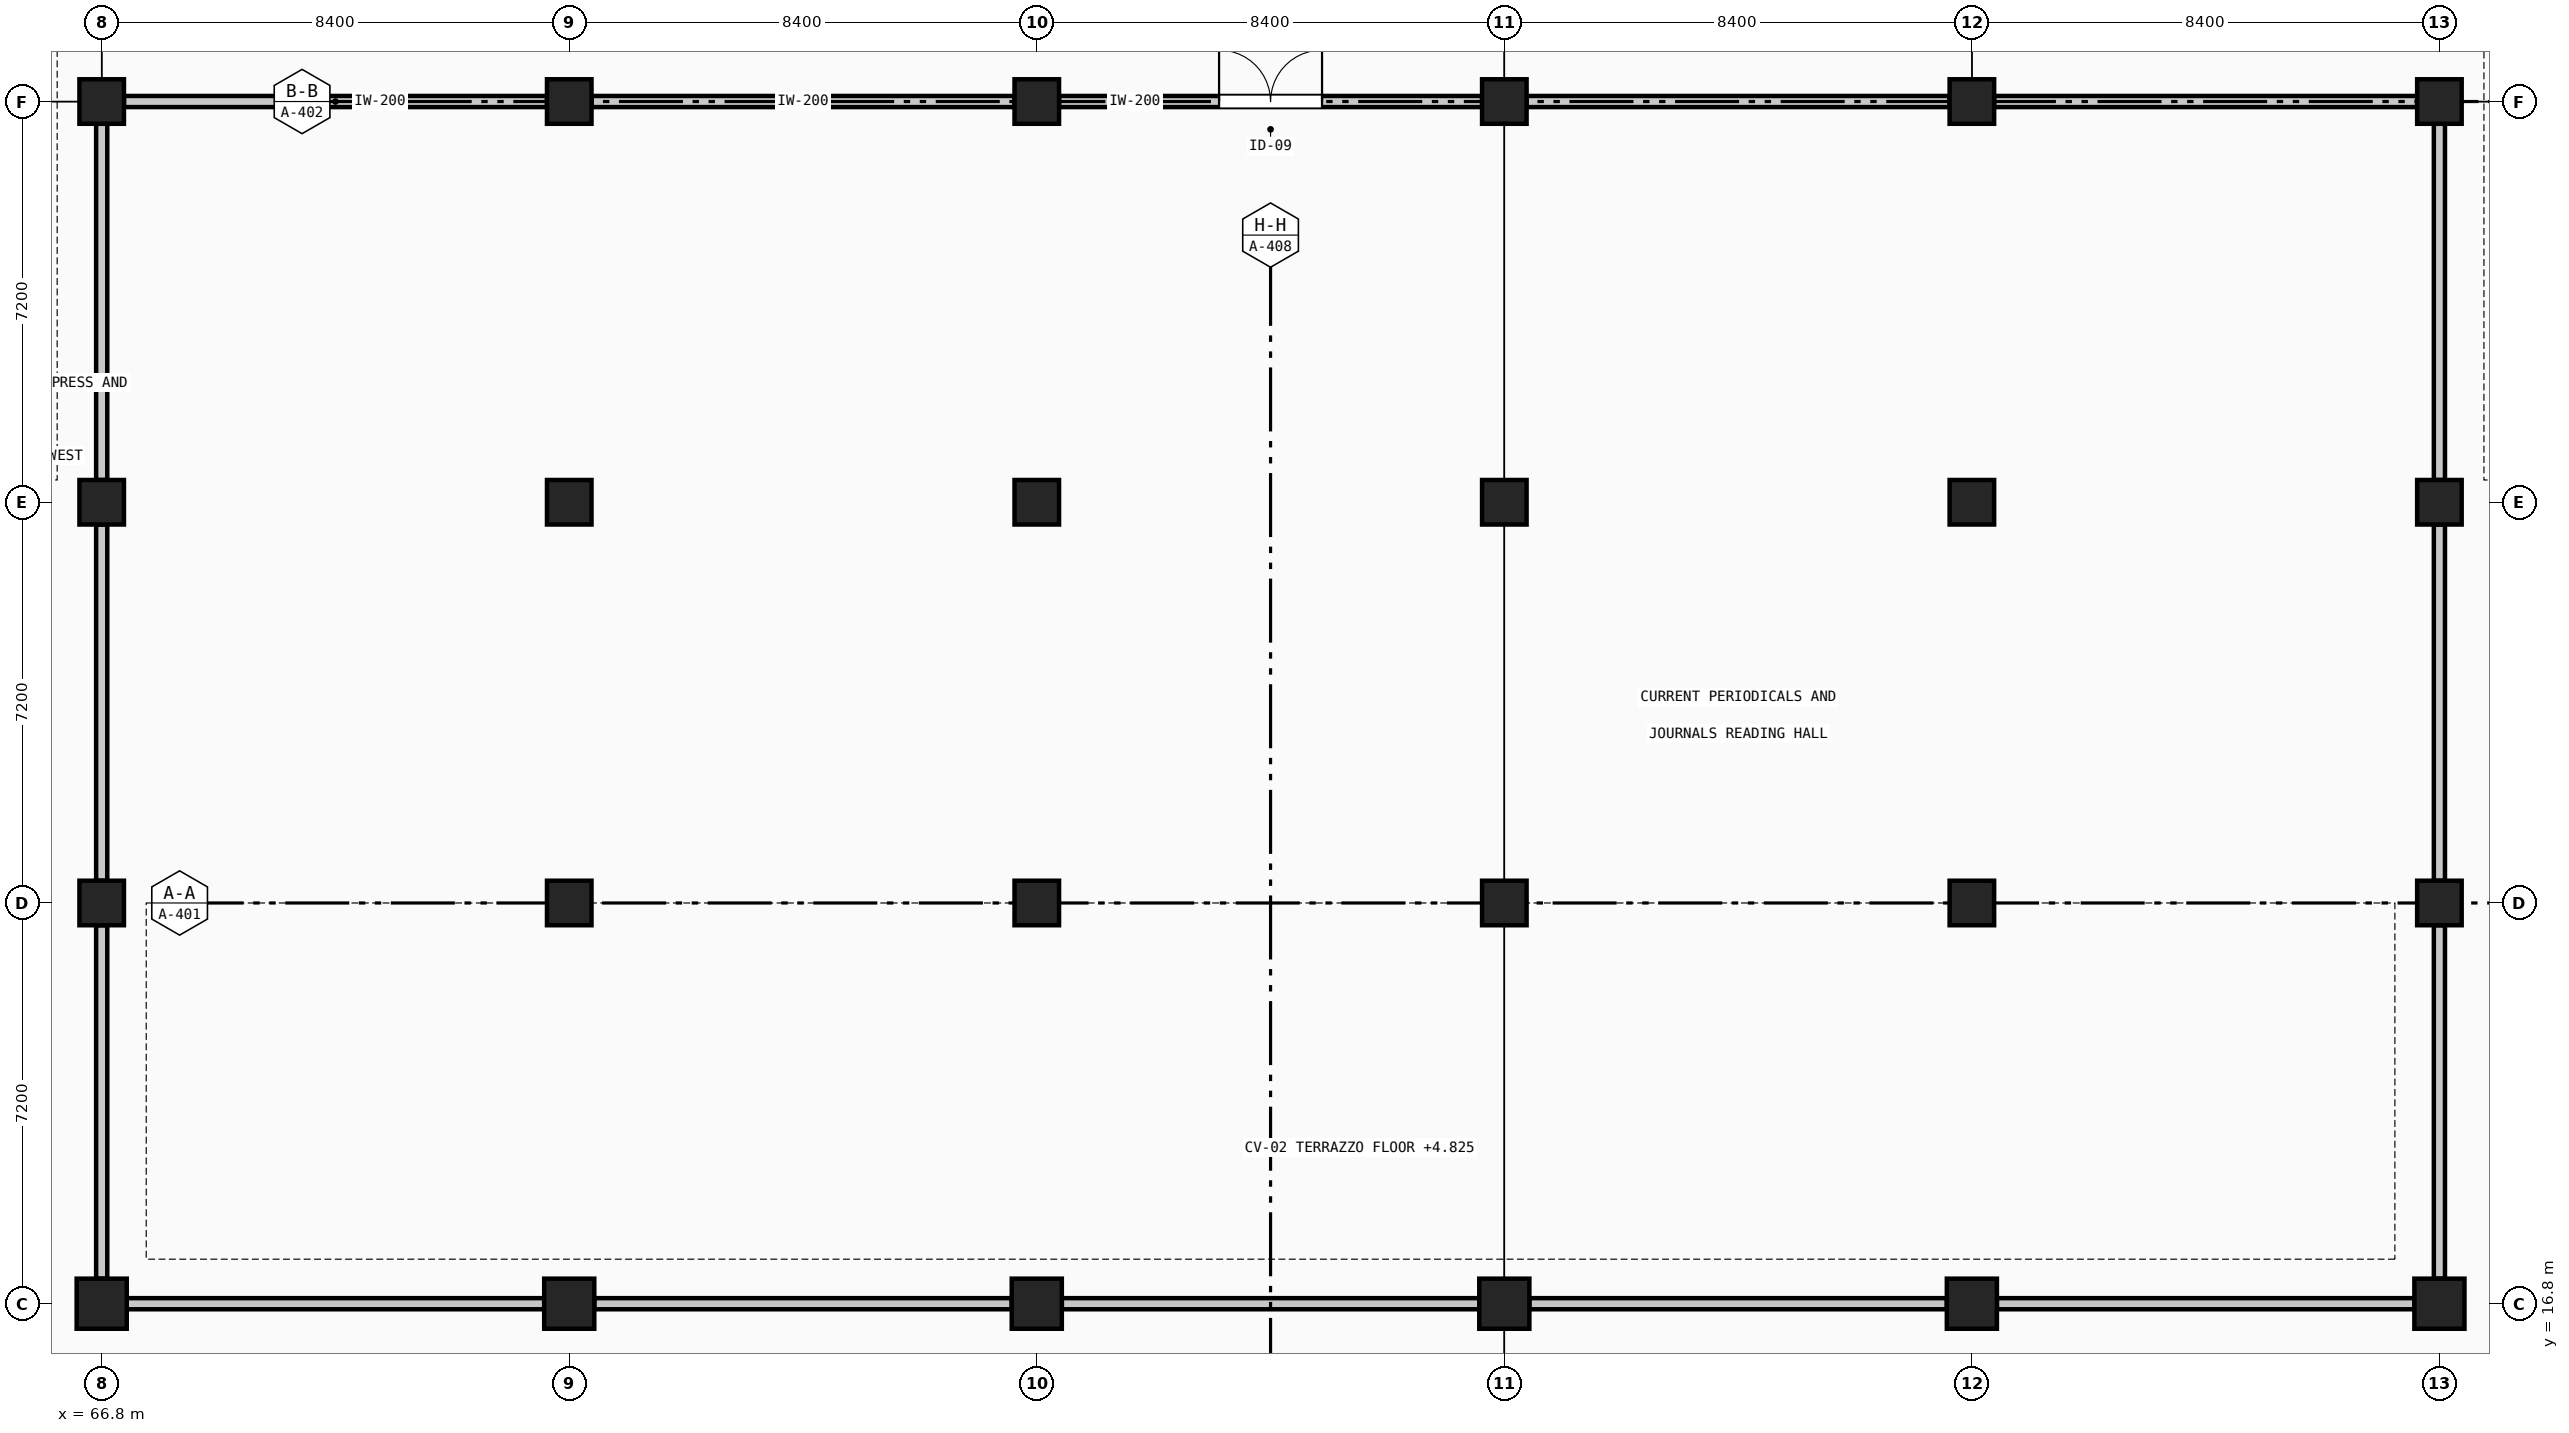
"""IFC4 building model, lengths in metres.
Left out: names, types, materials, properties, quantities, classifications, styles, units other than length and angle.
Written with IfcOpenShell. Run it as: python <this file> out.ifc"""

import sys

from ifc_helpers import new_model, si_unit, direction, frame, frame_2d, origin, origin_2d, place, context, subcontext, project, spatial, rectangle, extrude, element, fill, save


model = new_model("IFC4")
c1 = context("Model", 3, precision=1e-05, world=origin(), true_north=direction((0.0, 1.0)))
c2 = subcontext(c1, "Body", "Model", "MODEL_VIEW")
j1 = project(units=[si_unit("LENGTHUNIT", "METRE"), si_unit("PLANEANGLEUNIT", "RADIAN")], contexts=[c1])
p1 = place(None, origin())
s1 = spatial("IfcSite", under=j1, at=p1, CompositionType="ELEMENT")
p2 = place(p1, origin())
s2 = spatial("IfcBuilding", under=s1, at=p2, CompositionType="ELEMENT")
p3 = place(p2, frame((0.0, 0.0, 4.8)))
s3 = spatial("IfcBuildingStorey", under=s2, at=p3, CompositionType="ELEMENT", Elevation=4.8)
p4 = place(p3, frame((66.8, 16.8, 0.0), z_axis=(0.0, 0.0, 1.0), x_axis=(1.0, 0.0, 0.0)))
e1 = element("IfcColumn", 1, at=p4, inside=s3, PredefinedType="COLUMN", context=c2, shape_type="SweptSolid", body=[
    extrude(rectangle(XDim=0.9, YDim=0.9, at=origin_2d()), origin(), (0.0, 0.0, 1.0), 4.8),
])
for number, where, z_axis, x_axis in (
    (2, (66.8, 24.0, 0.0), (0.0, 0.0, 1.0), (1.0, 0.0, 0.0)),
    (3, (66.8, 31.2, 0.0), (0.0, 0.0, 1.0), (1.0, 0.0, 0.0)),
    (4, (66.8, 38.4, 0.0), (0.0, 0.0, 1.0), (1.0, 0.0, 0.0)),
):
    element("IfcColumn", number, at=place(p3, frame(where, z_axis=z_axis, x_axis=x_axis)), inside=s3, PredefinedType="COLUMN", context=c2, shape_type="SweptSolid", body=[
        extrude(rectangle(XDim=0.8, YDim=0.8, at=origin_2d()), origin(), (0.0, 0.0, 1.0), 4.8),
    ])
p5 = place(p3, frame((75.2, 16.8, 0.0), z_axis=(0.0, 0.0, 1.0), x_axis=(1.0, 0.0, 0.0)))
e5 = element("IfcColumn", 5, at=p5, inside=s3, PredefinedType="COLUMN", context=c2, shape_type="SweptSolid", body=[
    extrude(rectangle(XDim=0.9, YDim=0.9, at=origin_2d()), origin(), (0.0, 0.0, 1.0), 4.8),
])
for number, where, z_axis, x_axis in (
    (6, (75.2, 24.0, 0.0), (0.0, 0.0, 1.0), (1.0, 0.0, 0.0)),
    (7, (75.2, 31.2, 0.0), (0.0, 0.0, 1.0), (1.0, 0.0, 0.0)),
    (8, (75.2, 38.4, 0.0), (0.0, 0.0, 1.0), (1.0, 0.0, 0.0)),
):
    element("IfcColumn", number, at=place(p3, frame(where, z_axis=z_axis, x_axis=x_axis)), inside=s3, PredefinedType="COLUMN", context=c2, shape_type="SweptSolid", body=[
        extrude(rectangle(XDim=0.8, YDim=0.8, at=origin_2d()), origin(), (0.0, 0.0, 1.0), 4.8),
    ])
p6 = place(p3, frame((83.6, 16.8, 0.0), z_axis=(0.0, 0.0, 1.0), x_axis=(1.0, 0.0, 0.0)))
e9 = element("IfcColumn", 9, at=p6, inside=s3, PredefinedType="COLUMN", context=c2, shape_type="SweptSolid", body=[
    extrude(rectangle(XDim=0.9, YDim=0.9, at=origin_2d()), origin(), (0.0, 0.0, 1.0), 4.8),
])
for number, where, z_axis, x_axis in (
    (10, (83.6, 24.0, 0.0), (0.0, 0.0, 1.0), (1.0, 0.0, 0.0)),
    (11, (83.6, 31.2, 0.0), (0.0, 0.0, 1.0), (1.0, 0.0, 0.0)),
    (12, (83.6, 38.4, 0.0), (0.0, 0.0, 1.0), (1.0, 0.0, 0.0)),
):
    element("IfcColumn", number, at=place(p3, frame(where, z_axis=z_axis, x_axis=x_axis)), inside=s3, PredefinedType="COLUMN", context=c2, shape_type="SweptSolid", body=[
        extrude(rectangle(XDim=0.8, YDim=0.8, at=origin_2d()), origin(), (0.0, 0.0, 1.0), 4.8),
    ])
p7 = place(p3, frame((92.0, 16.8, 0.0), z_axis=(0.0, 0.0, 1.0), x_axis=(1.0, 0.0, 0.0)))
e13 = element("IfcColumn", 13, at=p7, inside=s3, PredefinedType="COLUMN", context=c2, shape_type="SweptSolid", body=[
    extrude(rectangle(XDim=0.9, YDim=0.9, at=origin_2d()), origin(), (0.0, 0.0, 1.0), 4.8),
])
for number, where, z_axis, x_axis in (
    (14, (92.0, 24.0, 0.0), (0.0, 0.0, 1.0), (1.0, 0.0, 0.0)),
    (15, (92.0, 31.2, 0.0), (0.0, 0.0, 1.0), (1.0, 0.0, 0.0)),
    (16, (92.0, 38.4, 0.0), (0.0, 0.0, 1.0), (1.0, 0.0, 0.0)),
):
    element("IfcColumn", number, at=place(p3, frame(where, z_axis=z_axis, x_axis=x_axis)), inside=s3, PredefinedType="COLUMN", context=c2, shape_type="SweptSolid", body=[
        extrude(rectangle(XDim=0.8, YDim=0.8, at=origin_2d()), origin(), (0.0, 0.0, 1.0), 4.8),
    ])
p8 = place(p3, frame((100.4, 16.8, 0.0), z_axis=(0.0, 0.0, 1.0), x_axis=(1.0, 0.0, 0.0)))
e17 = element("IfcColumn", 17, at=p8, inside=s3, PredefinedType="COLUMN", context=c2, shape_type="SweptSolid", body=[
    extrude(rectangle(XDim=0.9, YDim=0.9, at=origin_2d()), origin(), (0.0, 0.0, 1.0), 4.8),
])
for number, where, z_axis, x_axis in (
    (18, (100.4, 24.0, 0.0), (0.0, 0.0, 1.0), (1.0, 0.0, 0.0)),
    (19, (100.4, 31.2, 0.0), (0.0, 0.0, 1.0), (1.0, 0.0, 0.0)),
    (20, (100.4, 38.4, 0.0), (0.0, 0.0, 1.0), (1.0, 0.0, 0.0)),
):
    element("IfcColumn", number, at=place(p3, frame(where, z_axis=z_axis, x_axis=x_axis)), inside=s3, PredefinedType="COLUMN", context=c2, shape_type="SweptSolid", body=[
        extrude(rectangle(XDim=0.8, YDim=0.8, at=origin_2d()), origin(), (0.0, 0.0, 1.0), 4.8),
    ])
p9 = place(p3, frame((108.8, 16.8, 0.0), z_axis=(0.0, 0.0, 1.0), x_axis=(1.0, 0.0, 0.0)))
e21 = element("IfcColumn", 21, at=p9, inside=s3, PredefinedType="COLUMN", context=c2, shape_type="SweptSolid", body=[
    extrude(rectangle(XDim=0.9, YDim=0.9, at=origin_2d()), origin(), (0.0, 0.0, 1.0), 4.8),
])
for number, where, z_axis, x_axis in (
    (22, (108.8, 24.0, 0.0), (0.0, 0.0, 1.0), (1.0, 0.0, 0.0)),
    (23, (108.8, 31.2, 0.0), (0.0, 0.0, 1.0), (1.0, 0.0, 0.0)),
    (24, (108.8, 38.4, 0.0), (0.0, 0.0, 1.0), (1.0, 0.0, 0.0)),
):
    element("IfcColumn", number, at=place(p3, frame(where, z_axis=z_axis, x_axis=x_axis)), inside=s3, PredefinedType="COLUMN", context=c2, shape_type="SweptSolid", body=[
        extrude(rectangle(XDim=0.8, YDim=0.8, at=origin_2d()), origin(), (0.0, 0.0, 1.0), 4.8),
    ])
p10 = place(p3, frame((67.2, 38.4, 0.0), z_axis=(0.0, 0.0, 1.0), x_axis=(1.0, 0.0, 0.0)))
e25 = element("IfcWall", 25, at=p10, inside=s3, PredefinedType="PARTITIONING", context=c2, shape_type="SweptSolid", body=[
    extrude(rectangle(XDim=7.6, YDim=0.2, at=frame_2d((3.8, 0.0))), origin(), (0.0, 0.0, 1.0), 4.0),
])
p11 = place(p3, frame((75.6, 38.4, 0.0), z_axis=(0.0, 0.0, 1.0), x_axis=(1.0, 0.0, 0.0)))
e26 = element("IfcWall", 26, at=p11, inside=s3, PredefinedType="PARTITIONING", context=c2, shape_type="SweptSolid", body=[
    extrude(rectangle(XDim=7.6, YDim=0.2, at=frame_2d((3.8, 0.0))), origin(), (0.0, 0.0, 1.0), 4.0),
])
p12 = place(p3, frame((84.0, 38.4, 0.0), z_axis=(0.0, 0.0, 1.0), x_axis=(1.0, 0.0, 0.0)))
e27 = element("IfcWall", 27, at=p12, inside=s3, PredefinedType="PARTITIONING", context=c2, shape_type="SweptSolid", body=[
    extrude(rectangle(XDim=7.6, YDim=0.2, at=frame_2d((3.8, 0.0))), origin(), (0.0, 0.0, 1.0), 4.0),
])
p13 = place(p12, frame((2.875, 0.0, 0.0)))
e28 = element("IfcOpeningElement", 28, at=p13, cuts=e27, PredefinedType="OPENING", context=c2, shape_type="SweptSolid", body=[
    extrude(rectangle(XDim=1.85, YDim=2.3, at=frame_2d((0.925, 1.15))), frame((0.0, 0.11, 0.0), z_axis=(0.0, -1.0, 0.0), x_axis=(1.0, 0.0, 0.0)), (0.0, 0.0, 1.0), 0.22),
])
p14 = place(p3, frame((92.4, 38.4, 0.0), z_axis=(0.0, 0.0, 1.0), x_axis=(1.0, 0.0, 0.0)))
e29 = element("IfcWall", 29, at=p14, inside=s3, PredefinedType="PARTITIONING", context=c2, shape_type="SweptSolid", body=[
    extrude(rectangle(XDim=7.6, YDim=0.2, at=frame_2d((3.8, 0.0))), origin(), (0.0, 0.0, 1.0), 4.0),
])
p15 = place(p3, frame((100.8, 38.4, 0.0), z_axis=(0.0, 0.0, 1.0), x_axis=(1.0, 0.0, 0.0)))
e30 = element("IfcWall", 30, at=p15, inside=s3, PredefinedType="PARTITIONING", context=c2, shape_type="SweptSolid", body=[
    extrude(rectangle(XDim=7.6, YDim=0.2, at=frame_2d((3.8, 0.0))), origin(), (0.0, 0.0, 1.0), 4.0),
])
for number, where, z_axis, x_axis in (
    (31, (108.35, 16.8, 0.0), (0.0, 0.0, 1.0), (-1.0, 0.0, 0.0)),
    (32, (99.95, 16.8, 0.0), (0.0, 0.0, 1.0), (-1.0, 0.0, 0.0)),
    (33, (91.55, 16.8, 0.0), (0.0, 0.0, 1.0), (-1.0, 0.0, 0.0)),
    (34, (83.15, 16.8, 0.0), (0.0, 0.0, 1.0), (-1.0, 0.0, 0.0)),
    (35, (74.75, 16.8, 0.0), (0.0, 0.0, 1.0), (-1.0, 0.0, 0.0)),
):
    element("IfcWall", number, at=place(p3, frame(where, z_axis=z_axis, x_axis=x_axis)), inside=s3, PredefinedType="PARTITIONING", context=c2, shape_type="SweptSolid", body=[
        extrude(rectangle(XDim=7.5, YDim=0.2, at=frame_2d((3.75, 0.0))), origin(), (0.0, 0.0, 1.0), 4.0),
    ])
p16 = place(p3, frame((66.8, 17.25, 0.0), z_axis=(0.0, 0.0, 1.0), x_axis=(0.0, 1.0, 0.0)))
e36 = element("IfcWall", 36, at=p16, inside=s3, PredefinedType="PARTITIONING", context=c2, shape_type="SweptSolid", body=[
    extrude(rectangle(XDim=6.35, YDim=0.2, at=frame_2d((3.175, 0.0))), origin(), (0.0, 0.0, 1.0), 3.9),
])
p17 = place(p3, frame((66.8, 24.4, 0.0), z_axis=(0.0, 0.0, 1.0), x_axis=(0.0, 1.0, 0.0)))
e37 = element("IfcWall", 37, at=p17, inside=s3, PredefinedType="PARTITIONING", context=c2, shape_type="SweptSolid", body=[
    extrude(rectangle(XDim=6.4, YDim=0.2, at=frame_2d((3.2, 0.0))), origin(), (0.0, 0.0, 1.0), 3.9),
])
for number, where, z_axis, x_axis in (
    (38, (66.8, 31.6, 0.0), (0.0, 0.0, 1.0), (0.0, 1.0, 0.0)),
    (39, (108.8, 38.0, 0.0), (0.0, 0.0, 1.0), (0.0, -1.0, 0.0)),
):
    element("IfcWall", number, at=place(p3, frame(where, z_axis=z_axis, x_axis=x_axis)), inside=s3, PredefinedType="PARTITIONING", context=c2, shape_type="SweptSolid", body=[
        extrude(rectangle(XDim=6.4, YDim=0.2, at=frame_2d((3.2, 0.0))), origin(), (0.0, 0.0, 1.0), 3.9),
    ])
p18 = place(p3, frame((108.8, 30.8, 0.0), z_axis=(0.0, 0.0, 1.0), x_axis=(0.0, -1.0, 0.0)))
e40 = element("IfcWall", 40, at=p18, inside=s3, PredefinedType="PARTITIONING", context=c2, shape_type="SweptSolid", body=[
    extrude(rectangle(XDim=6.4, YDim=0.2, at=frame_2d((3.2, 0.0))), origin(), (0.0, 0.0, 1.0), 3.9),
])
p19 = place(p3, frame((108.8, 23.6, 0.0), z_axis=(0.0, 0.0, 1.0), x_axis=(0.0, -1.0, 0.0)))
e41 = element("IfcWall", 41, at=p19, inside=s3, PredefinedType="PARTITIONING", context=c2, shape_type="SweptSolid", body=[
    extrude(rectangle(XDim=6.35, YDim=0.2, at=frame_2d((3.175, 0.0))), origin(), (0.0, 0.0, 1.0), 3.9),
])
p20 = place(p13, origin())
e42 = element("IfcDoor", 42, at=p20, inside=s3, OperationType="DOUBLE_DOOR_SINGLE_SWING", PredefinedType="DOOR", context=c2, shape_type="SweptSolid", body=[
    extrude(rectangle(XDim=1.85, YDim=2.3, at=frame_2d((0.925, 1.15))), frame((0.0, 0.025, 0.0), z_axis=(0.0, -1.0, 0.0), x_axis=(1.0, 0.0, 0.0)), (0.0, 0.0, 1.0), 0.05),
])
fill(e28, e42)
save(model, sys.argv[1])
